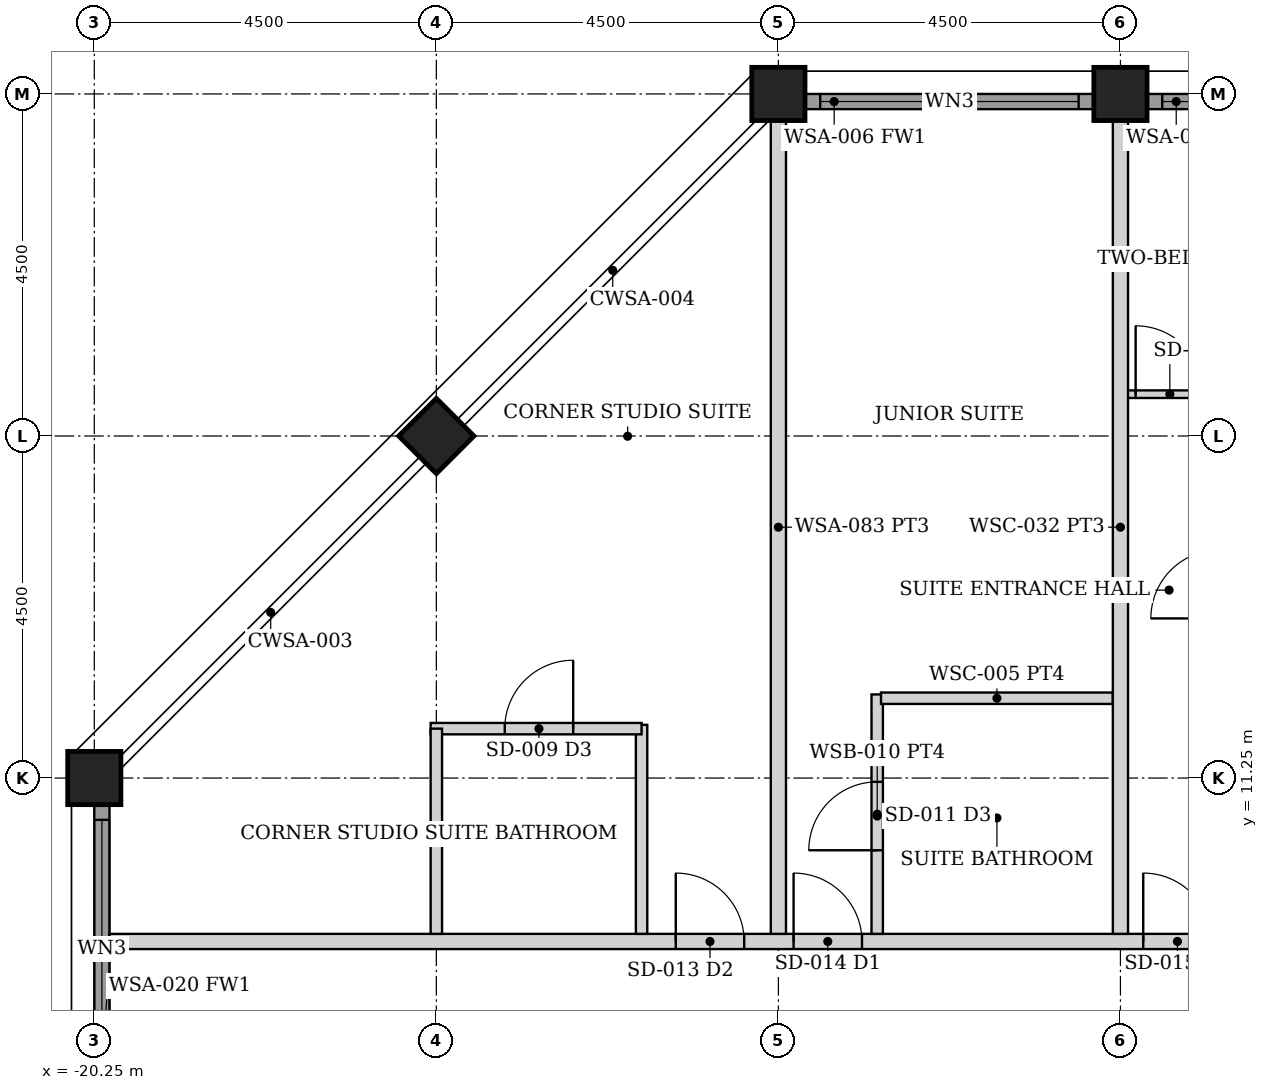
"""IFC4 building model, lengths in metres.
Left out: names, types, materials, properties, quantities, classifications, styles, units other than length and angle.
Written with IfcOpenShell. Run it as: python <this file> out.ifc"""

import sys

from ifc_helpers import new_model, si_unit, direction, frame, frame_2d, origin, origin_2d, place, context, subcontext, project, spatial, rectangle, hollow_rectangle, extrude, element, fill, save


model = new_model("IFC4")
c1 = context("Model", 3, precision=1e-05, world=origin(), true_north=direction((0.0, 1.0)))
c2 = subcontext(c1, "Body", "Model", "MODEL_VIEW")
j1 = project(units=[si_unit("LENGTHUNIT", "METRE"), si_unit("PLANEANGLEUNIT", "RADIAN")], contexts=[c1])
p1 = place(None, origin())
s1 = spatial("IfcSite", under=j1, at=p1, CompositionType="ELEMENT")
p2 = place(p1, origin())
s2 = spatial("IfcBuilding", under=s1, at=p2, CompositionType="ELEMENT")
p3 = place(p2, frame((0.0, 0.0, 234.55)))
s3 = spatial("IfcBuildingStorey", under=s2, at=p3, CompositionType="ELEMENT", Elevation=234.55)
for number, where, z_axis, x_axis in (
    (1, (-11.25, 20.25, 0.0), (0.0, 0.0, 1.0), (0.0, 1.0, 0.0)),
    (2, (-6.75, 20.25, 0.0), (0.0, 0.0, 1.0), (0.0, 1.0, 0.0)),
    (3, (-20.25, 11.25, 0.0), (0.0, 0.0, 1.0), (1.0, 0.0, 0.0)),
    (4, (-15.75, 15.75, 0.0), (0.0, 0.0, 1.0), (0.707, -0.707, 0.0)),
):
    element("IfcColumn", number, at=place(p3, frame(where, z_axis=z_axis, x_axis=x_axis)), inside=s3, PredefinedType="COLUMN", context=c2, shape_type="SweptSolid", body=[
        extrude(hollow_rectangle(XDim=0.7, YDim=0.7, WallThickness=0.04, at=origin_2d()), origin(), (0.0, 0.0, 1.0), 3.75),
    ])
p4 = place(p3, frame((-10.895, 20.15, 0.0), z_axis=(0.0, 0.0, 1.0), x_axis=(1.0, 0.0, 0.0)))
e5 = element("IfcWall", 5, at=p4, inside=s3, PredefinedType="SOLIDWALL", context=c2, shape_type="SweptSolid", body=[
    extrude(rectangle(XDim=3.79, YDim=0.2, at=frame_2d((1.895, 0.0))), origin(), (0.0, 0.0, 1.0), 2.629),
])
p5 = place(p4, frame((0.195, 0.0, 0.3)))
e6 = element("IfcOpeningElement", 6, at=p5, cuts=e5, PredefinedType="OPENING", context=c2, shape_type="SweptSolid", body=[
    extrude(rectangle(XDim=3.4, YDim=2.179, at=frame_2d((1.7, 1.089))), frame((0.0, 0.11, 0.0), z_axis=(0.0, -1.0, 0.0), x_axis=(1.0, 0.0, 0.0)), (0.0, 0.0, 1.0), 0.22),
])
p6 = place(p3, frame((-6.395, 20.15, 0.0), z_axis=(0.0, 0.0, 1.0), x_axis=(1.0, 0.0, 0.0)))
e7 = element("IfcWall", 7, at=p6, inside=s3, PredefinedType="SOLIDWALL", context=c2, shape_type="SweptSolid", body=[
    extrude(rectangle(XDim=3.79, YDim=0.2, at=frame_2d((1.895, 0.0))), origin(), (0.0, 0.0, 1.0), 2.629),
])
p7 = place(p6, frame((0.195, 0.0, 0.3)))
e8 = element("IfcOpeningElement", 8, at=p7, cuts=e7, PredefinedType="OPENING", context=c2, shape_type="SweptSolid", body=[
    extrude(rectangle(XDim=3.4, YDim=2.179, at=frame_2d((1.7, 1.089))), frame((0.0, 0.11, 0.0), z_axis=(0.0, -1.0, 0.0), x_axis=(1.0, 0.0, 0.0)), (0.0, 0.0, 1.0), 0.22),
])
p8 = place(p3, frame((-20.15, 7.105, 0.0), z_axis=(0.0, 0.0, 1.0), x_axis=(0.0, 1.0, 0.0)))
e9 = element("IfcWall", 9, at=p8, inside=s3, PredefinedType="SOLIDWALL", context=c2, shape_type="SweptSolid", body=[
    extrude(rectangle(XDim=3.79, YDim=0.2, at=frame_2d((1.895, 0.0))), origin(), (0.0, 0.0, 1.0), 2.629),
])
p9 = place(p8, frame((0.195, 0.0, 0.3)))
e10 = element("IfcOpeningElement", 10, at=p9, cuts=e9, PredefinedType="OPENING", context=c2, shape_type="SweptSolid", body=[
    extrude(rectangle(XDim=3.4, YDim=2.179, at=frame_2d((1.7, 1.089))), frame((0.0, 0.11, 0.0), z_axis=(0.0, -1.0, 0.0), x_axis=(1.0, 0.0, 0.0)), (0.0, 0.0, 1.0), 0.22),
])
p10 = place(p3, frame((-20.05, 9.1, 0.0), z_axis=(0.0, 0.0, 1.0), x_axis=(1.0, 0.0, 0.0)))
e11 = element("IfcWall", 11, at=p10, inside=s3, PredefinedType="PARTITIONING", context=c2, shape_type="SweptSolid", body=[
    extrude(rectangle(XDim=40.1, YDim=0.2, at=frame_2d((20.05, 0.0))), origin(), (0.0, 0.0, 1.0), 2.629),
])
p11 = place(p10, frame((9.0, 0.0, 0.0)))
e12 = element("IfcOpeningElement", 12, at=p11, cuts=e11, PredefinedType="OPENING", context=c2, shape_type="SweptSolid", body=[
    extrude(rectangle(XDim=0.9, YDim=2.1, at=frame_2d((0.45, 1.05))), frame((0.0, 0.11, 0.0), z_axis=(0.0, -1.0, 0.0), x_axis=(1.0, 0.0, 0.0)), (0.0, 0.0, 1.0), 0.22),
])
p12 = place(p10, frame((13.6, 0.0, 0.0)))
e13 = element("IfcOpeningElement", 13, at=p12, cuts=e11, PredefinedType="OPENING", context=c2, shape_type="SweptSolid", body=[
    extrude(rectangle(XDim=0.9, YDim=2.1, at=frame_2d((0.45, 1.05))), frame((0.0, 0.11, 0.0), z_axis=(0.0, -1.0, 0.0), x_axis=(1.0, 0.0, 0.0)), (0.0, 0.0, 1.0), 0.22),
])
p13 = place(p10, frame((30.2, 0.0, 0.0)))
e14 = element("IfcOpeningElement", 14, at=p13, cuts=e11, PredefinedType="OPENING", context=c2, shape_type="SweptSolid", body=[
    extrude(rectangle(XDim=0.9, YDim=2.1, at=frame_2d((0.45, 1.05))), frame((0.0, 0.11, 0.0), z_axis=(0.0, -1.0, 0.0), x_axis=(1.0, 0.0, 0.0)), (0.0, 0.0, 1.0), 0.22),
])
p14 = place(p10, frame((31.75, 0.0, 0.0)))
e15 = element("IfcOpeningElement", 15, at=p14, cuts=e11, PredefinedType="OPENING", context=c2, shape_type="SweptSolid", body=[
    extrude(rectangle(XDim=0.9, YDim=2.1, at=frame_2d((0.45, 1.05))), frame((0.0, 0.11, 0.0), z_axis=(0.0, -1.0, 0.0), x_axis=(1.0, 0.0, 0.0)), (0.0, 0.0, 1.0), 0.22),
])
p15 = place(p10, frame((7.45, 0.0, 0.0)))
e16 = element("IfcOpeningElement", 16, at=p15, cuts=e11, PredefinedType="OPENING", context=c2, shape_type="SweptSolid", body=[
    extrude(rectangle(XDim=0.9, YDim=2.1, at=frame_2d((0.45, 1.05))), frame((0.0, 0.11, 0.0), z_axis=(0.0, -1.0, 0.0), x_axis=(1.0, 0.0, 0.0)), (0.0, 0.0, 1.0), 0.22),
])
p16 = place(p3, frame((-9.95, 9.2, 0.0), z_axis=(0.0, 0.0, 1.0), x_axis=(0.0, 1.0, 0.0)))
e17 = element("IfcWall", 17, at=p16, inside=s3, PredefinedType="PARTITIONING", context=c2, shape_type="SweptSolid", body=[
    extrude(rectangle(XDim=3.15, YDim=0.15, at=frame_2d((1.575, 0.0))), origin(), (0.0, 0.0, 1.0), 2.629),
])
p17 = place(p16, frame((1.1, 0.0, 0.0)))
e18 = element("IfcOpeningElement", 18, at=p17, cuts=e17, PredefinedType="OPENING", context=c2, shape_type="SweptSolid", body=[
    extrude(rectangle(XDim=0.9, YDim=2.1, at=frame_2d((0.45, 1.05))), frame((0.0, 0.085, 0.0), z_axis=(0.0, -1.0, 0.0), x_axis=(1.0, 0.0, 0.0)), (0.0, 0.0, 1.0), 0.17),
])
p18 = place(p3, frame((-9.9, 12.3, 0.0), z_axis=(0.0, 0.0, 1.0), x_axis=(1.0, 0.0, 0.0)))
e19 = element("IfcWall", 19, at=p18, inside=s3, PredefinedType="PARTITIONING", context=c2, shape_type="SweptSolid", body=[
    extrude(rectangle(XDim=3.05, YDim=0.15, at=frame_2d((1.525, 0.0))), origin(), (0.0, 0.0, 1.0), 2.629),
])
p19 = place(p3, frame((-6.69, 16.3, 0.0), z_axis=(0.0, 0.0, 1.0), x_axis=(1.0, 0.0, 0.0)))
e20 = element("IfcWall", 20, at=p19, inside=s3, PredefinedType="PARTITIONING", context=c2, shape_type="SweptSolid", body=[
    extrude(rectangle(XDim=4.39, YDim=0.1, at=frame_2d((2.195, 0.0))), origin(), (0.0, 0.0, 1.0), 2.629),
])
p20 = place(p19, frame((0.14, 0.0, 0.0)))
e21 = element("IfcOpeningElement", 21, at=p20, cuts=e20, PredefinedType="OPENING", context=c2, shape_type="SweptSolid", body=[
    extrude(rectangle(XDim=0.9, YDim=2.1, at=frame_2d((0.45, 1.05))), frame((0.0, 0.06, 0.0), z_axis=(0.0, -1.0, 0.0), x_axis=(1.0, 0.0, 0.0)), (0.0, 0.0, 1.0), 0.12),
])
for number, where, z_axis, x_axis in (
    (22, (-11.25, 9.2, 0.0), (0.0, 0.0, 1.0), (0.0, 1.0, 0.0)),
    (23, (-6.75, 9.2, 0.0), (0.0, 0.0, 1.0), (0.0, 1.0, 0.0)),
):
    element("IfcWall", number, at=place(p3, frame(where, z_axis=z_axis, x_axis=x_axis)), inside=s3, PredefinedType="PARTITIONING", context=c2, shape_type="SweptSolid", body=[
        extrude(rectangle(XDim=10.7, YDim=0.2, at=frame_2d((5.35, 0.0))), origin(), (0.0, 0.0, 1.0), 2.629),
    ])
p21 = place(p3, frame((-13.05, 9.2, 0.0), z_axis=(0.0, 0.0, 1.0), x_axis=(0.0, 1.0, 0.0)))
e24 = element("IfcWall", 24, at=p21, inside=s3, PredefinedType="PARTITIONING", context=c2, shape_type="SweptSolid", body=[
    extrude(rectangle(XDim=2.75, YDim=0.15, at=frame_2d((1.375, 0.0))), origin(), (0.0, 0.0, 1.0), 2.629),
])
p22 = place(p3, frame((-15.825, 11.9, 0.0), z_axis=(0.0, 0.0, 1.0), x_axis=(1.0, 0.0, 0.0)))
e25 = element("IfcWall", 25, at=p22, inside=s3, PredefinedType="PARTITIONING", context=c2, shape_type="SweptSolid", body=[
    extrude(rectangle(XDim=2.775, YDim=0.15, at=frame_2d((1.387, 0.0))), origin(), (0.0, 0.0, 1.0), 2.629),
])
p23 = place(p22, frame((0.975, 0.0, 0.0)))
e26 = element("IfcOpeningElement", 26, at=p23, cuts=e25, PredefinedType="OPENING", context=c2, shape_type="SweptSolid", body=[
    extrude(rectangle(XDim=0.9, YDim=2.1, at=frame_2d((0.45, 1.05))), frame((0.0, 0.085, 0.0), z_axis=(0.0, -1.0, 0.0), x_axis=(1.0, 0.0, 0.0)), (0.0, 0.0, 1.0), 0.17),
])
p24 = place(p3, frame((-15.75, 9.2, 0.0), z_axis=(0.0, 0.0, 1.0), x_axis=(0.0, 1.0, 0.0)))
e27 = element("IfcWall", 27, at=p24, inside=s3, PredefinedType="PARTITIONING", context=c2, shape_type="SweptSolid", body=[
    extrude(rectangle(XDim=2.7, YDim=0.15, at=frame_2d((1.35, 0.0))), origin(), (0.0, 0.0, 1.0), 2.629),
])
p25 = place(p5, origin())
e28 = element("IfcWindow", 28, at=p25, inside=s3, PartitioningType="SINGLE_PANEL", PredefinedType="WINDOW", context=c2, shape_type="SweptSolid", body=[
    extrude(rectangle(XDim=3.4, YDim=2.179, at=frame_2d((1.7, 1.089))), frame((0.0, 0.03, 0.0), z_axis=(0.0, -1.0, 0.0), x_axis=(1.0, 0.0, 0.0)), (0.0, 0.0, 1.0), 0.06),
])
fill(e6, e28)
p26 = place(p7, origin())
e29 = element("IfcWindow", 29, at=p26, inside=s3, PartitioningType="SINGLE_PANEL", PredefinedType="WINDOW", context=c2, shape_type="SweptSolid", body=[
    extrude(rectangle(XDim=3.4, YDim=2.179, at=frame_2d((1.7, 1.089))), frame((0.0, 0.03, 0.0), z_axis=(0.0, -1.0, 0.0), x_axis=(1.0, 0.0, 0.0)), (0.0, 0.0, 1.0), 0.06),
])
fill(e8, e29)
p27 = place(p9, origin())
e30 = element("IfcWindow", 30, at=p27, inside=s3, PartitioningType="SINGLE_PANEL", PredefinedType="WINDOW", context=c2, shape_type="SweptSolid", body=[
    extrude(rectangle(XDim=3.4, YDim=2.179, at=frame_2d((1.7, 1.089))), frame((0.0, 0.03, 0.0), z_axis=(0.0, -1.0, 0.0), x_axis=(1.0, 0.0, 0.0)), (0.0, 0.0, 1.0), 0.06),
])
fill(e10, e30)
p28 = place(p11, origin())
e31 = element("IfcDoor", 31, at=p28, inside=s3, OperationType="SINGLE_SWING_LEFT", PredefinedType="DOOR", context=c2, shape_type="SweptSolid", body=[
    extrude(rectangle(XDim=0.9, YDim=2.1, at=frame_2d((0.45, 1.05))), frame((0.0, 0.025, 0.0), z_axis=(0.0, -1.0, 0.0), x_axis=(1.0, 0.0, 0.0)), (0.0, 0.0, 1.0), 0.05),
])
fill(e12, e31)
p29 = place(p17, origin())
e32 = element("IfcDoor", 32, at=p29, inside=s3, OperationType="SINGLE_SWING_LEFT", PredefinedType="DOOR", context=c2, shape_type="SweptSolid", body=[
    extrude(rectangle(XDim=0.9, YDim=2.1, at=frame_2d((0.45, 1.05))), frame((0.0, 0.025, 0.0), z_axis=(0.0, -1.0, 0.0), x_axis=(1.0, 0.0, 0.0)), (0.0, 0.0, 1.0), 0.05),
])
fill(e18, e32)
p30 = place(p12, origin())
e33 = element("IfcDoor", 33, at=p30, inside=s3, OperationType="SINGLE_SWING_LEFT", PredefinedType="DOOR", context=c2, shape_type="SweptSolid", body=[
    extrude(rectangle(XDim=0.9, YDim=2.1, at=frame_2d((0.45, 1.05))), frame((0.0, 0.025, 0.0), z_axis=(0.0, -1.0, 0.0), x_axis=(1.0, 0.0, 0.0)), (0.0, 0.0, 1.0), 0.05),
])
fill(e13, e33)
p31 = place(p20, origin())
e34 = element("IfcDoor", 34, at=p31, inside=s3, OperationType="SINGLE_SWING_LEFT", PredefinedType="DOOR", context=c2, shape_type="SweptSolid", body=[
    extrude(rectangle(XDim=0.9, YDim=2.1, at=frame_2d((0.45, 1.05))), frame((0.0, 0.025, 0.0), z_axis=(0.0, -1.0, 0.0), x_axis=(1.0, 0.0, 0.0)), (0.0, 0.0, 1.0), 0.05),
])
fill(e21, e34)
p32 = place(p15, origin())
e35 = element("IfcDoor", 35, at=p32, inside=s3, OperationType="SINGLE_SWING_LEFT", PredefinedType="DOOR", context=c2, shape_type="SweptSolid", body=[
    extrude(rectangle(XDim=0.9, YDim=2.1, at=frame_2d((0.45, 1.05))), frame((0.0, 0.025, 0.0), z_axis=(0.0, -1.0, 0.0), x_axis=(1.0, 0.0, 0.0)), (0.0, 0.0, 1.0), 0.05),
])
fill(e16, e35)
p33 = place(p23, origin())
e36 = element("IfcDoor", 36, at=p33, inside=s3, OperationType="SINGLE_SWING_RIGHT", PredefinedType="DOOR", context=c2, shape_type="SweptSolid", body=[
    extrude(rectangle(XDim=0.9, YDim=2.1, at=frame_2d((0.45, 1.05))), frame((0.0, 0.025, 0.0), z_axis=(0.0, -1.0, 0.0), x_axis=(1.0, 0.0, 0.0)), (0.0, 0.0, 1.0), 0.05),
])
fill(e26, e36)
save(model, sys.argv[1])
